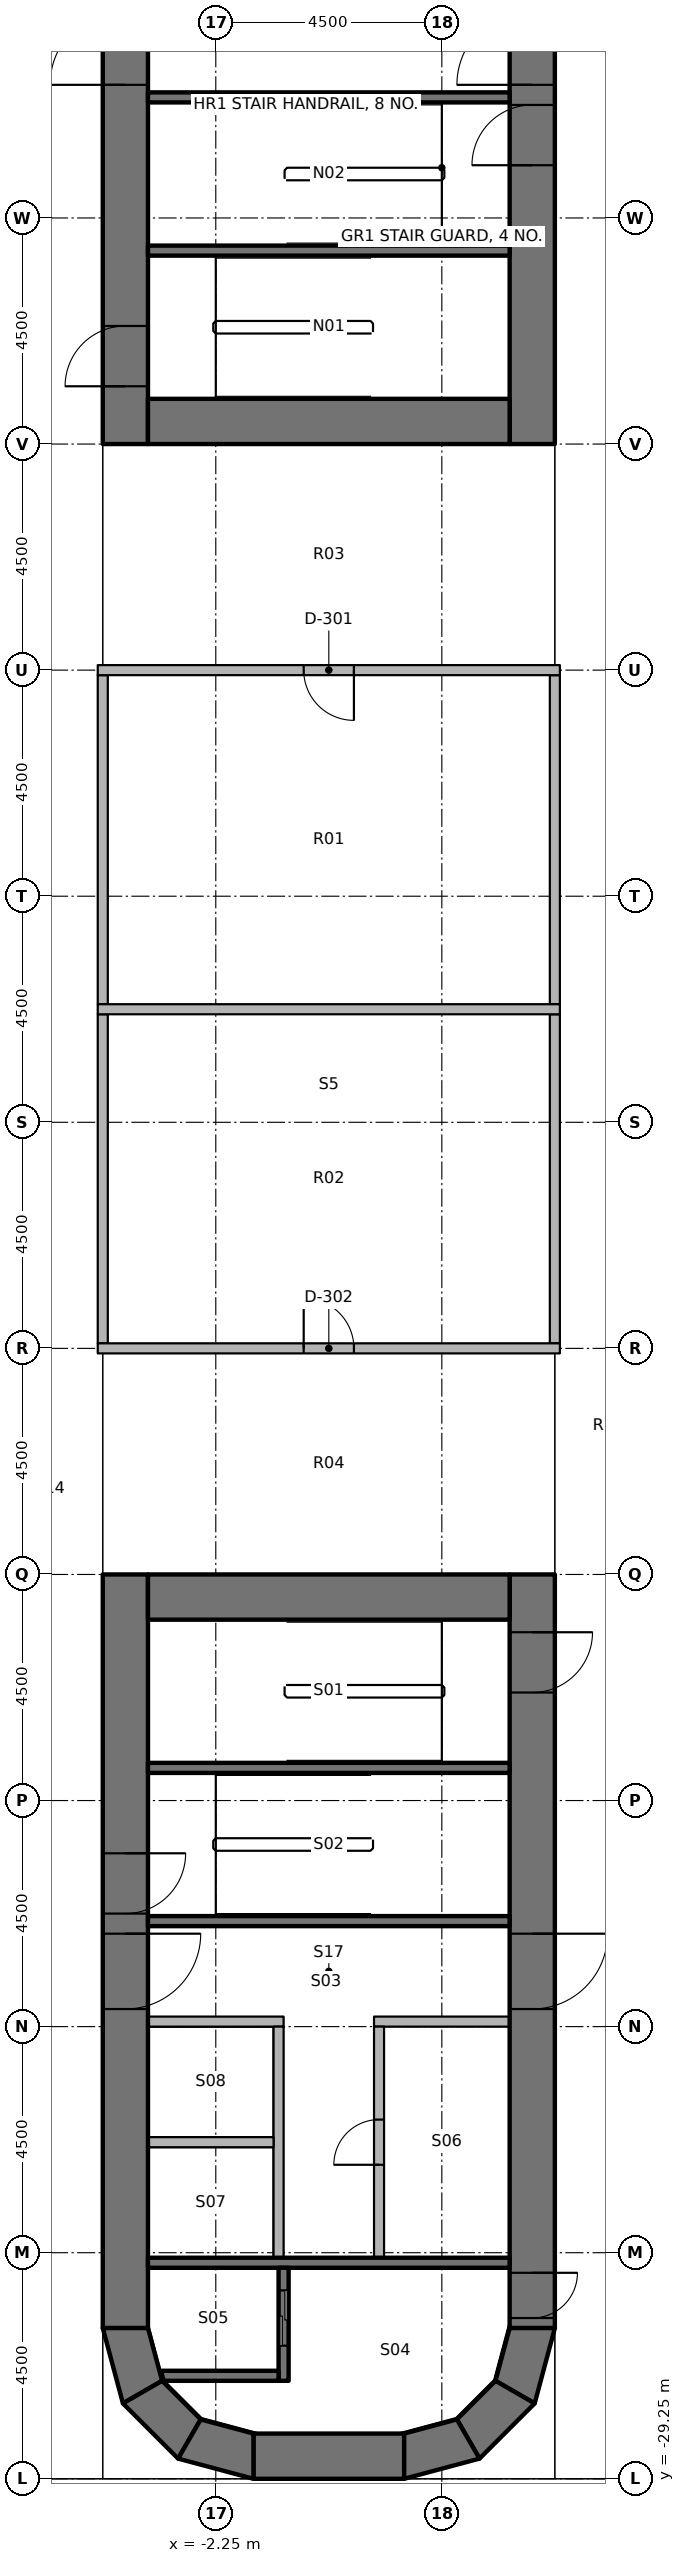
"""IFC4 building model, lengths in metres.
Left out: names, types, materials, properties, quantities, classifications, styles, units other than length and angle.
Written with IfcOpenShell. Run it as: python <this file> out.ifc"""

import sys

from ifc_helpers import new_model, si_unit, direction, frame, frame_2d, origin, place, context, subcontext, project, spatial, polyline, rectangle, outline, extrude, element, fill, save


model = new_model("IFC4")
c1 = context("Model", 3, precision=1e-05, world=origin(), true_north=direction((0.0, 1.0)))
c2 = subcontext(c1, "Body", "Model", "MODEL_VIEW")
j1 = project(units=[si_unit("LENGTHUNIT", "METRE"), si_unit("PLANEANGLEUNIT", "RADIAN")], contexts=[c1])
p1 = place(None, origin())
s1 = spatial("IfcSite", under=j1, at=p1, CompositionType="ELEMENT")
p2 = place(p1, origin())
s2 = spatial("IfcBuilding", under=s1, at=p2, CompositionType="ELEMENT")
p3 = place(p2, frame((0.0, 0.0, 43.8)))
s3 = spatial("IfcBuildingStorey", under=s2, at=p3, CompositionType="ELEMENT", Elevation=43.8)
p4 = place(p3, frame((-4.05, 11.25, 0.0), z_axis=(0.0, 0.0, 1.0), x_axis=(0.0, 1.0, 0.0)))
e1 = element("IfcWall", 1, at=p4, inside=s3, PredefinedType="SHEAR", context=c2, shape_type="SweptSolid", body=[
    extrude(rectangle(XDim=15.0, YDim=0.9, at=frame_2d((7.5, 0.0))), origin(), (0.0, 0.0, 1.0), 4.2),
])
p5 = place(p4, frame((7.15, 0.0, 0.0)))
e2 = element("IfcOpeningElement", 2, at=p5, cuts=e1, PredefinedType="OPENING", context=c2, shape_type="SweptSolid", body=[
    extrude(rectangle(XDim=1.5, YDim=2.3, at=frame_2d((0.75, 1.15))), frame((0.0, 0.46, 0.0), z_axis=(0.0, -1.0, 0.0), x_axis=(1.0, 0.0, 0.0)), (0.0, 0.0, 1.0), 0.92),
])
p6 = place(p4, frame((13.9, 0.0, 0.0)))
e3 = element("IfcOpeningElement", 3, at=p6, cuts=e1, PredefinedType="OPENING", context=c2, shape_type="SweptSolid", body=[
    extrude(rectangle(XDim=0.9, YDim=2.1, at=frame_2d((0.45, 1.05))), frame((0.0, 0.46, 0.0), z_axis=(0.0, -1.0, 0.0), x_axis=(1.0, 0.0, 0.0)), (0.0, 0.0, 1.0), 0.92),
])
p7 = place(p4, frame((1.15, 0.0, 0.0)))
e4 = element("IfcOpeningElement", 4, at=p7, cuts=e1, PredefinedType="OPENING", context=c2, shape_type="SweptSolid", body=[
    extrude(rectangle(XDim=1.2, YDim=2.1, at=frame_2d((0.6, 1.05))), frame((0.0, 0.46, 0.0), z_axis=(0.0, -1.0, 0.0), x_axis=(1.0, 0.0, 0.0)), (0.0, 0.0, 1.0), 0.92),
])
p8 = place(p3, frame((4.05, 11.25, 0.0), z_axis=(0.0, 0.0, 1.0), x_axis=(0.0, 1.0, 0.0)))
e5 = element("IfcWall", 5, at=p8, inside=s3, PredefinedType="SHEAR", context=c2, shape_type="SweptSolid", body=[
    extrude(rectangle(XDim=15.0, YDim=0.9, at=frame_2d((7.5, 0.0))), origin(), (0.0, 0.0, 1.0), 4.2),
])
p9 = place(p8, frame((7.15, 0.0, 0.0)))
e6 = element("IfcOpeningElement", 6, at=p9, cuts=e5, PredefinedType="OPENING", context=c2, shape_type="SweptSolid", body=[
    extrude(rectangle(XDim=1.5, YDim=2.3, at=frame_2d((0.75, 1.15))), frame((0.0, 0.46, 0.0), z_axis=(0.0, -1.0, 0.0), x_axis=(1.0, 0.0, 0.0)), (0.0, 0.0, 1.0), 0.92),
])
p10 = place(p8, frame((5.55, 0.0, 0.0)))
e7 = element("IfcOpeningElement", 7, at=p10, cuts=e5, PredefinedType="OPENING", context=c2, shape_type="SweptSolid", body=[
    extrude(rectangle(XDim=1.2, YDim=2.1, at=frame_2d((0.6, 1.05))), frame((0.0, 0.46, 0.0), z_axis=(0.0, -1.0, 0.0), x_axis=(1.0, 0.0, 0.0)), (0.0, 0.0, 1.0), 0.92),
])
p11 = place(p3, frame((-3.6, 11.7, 0.0), z_axis=(0.0, 0.0, 1.0), x_axis=(1.0, 0.0, 0.0)))
e8 = element("IfcWall", 8, at=p11, inside=s3, PredefinedType="SHEAR", context=c2, shape_type="SweptSolid", body=[
    extrude(rectangle(XDim=7.2, YDim=0.9, at=frame_2d((3.6, 0.0))), origin(), (0.0, 0.0, 1.0), 4.2),
])
p12 = place(p3, frame((-4.05, -11.25, 0.0), z_axis=(0.0, 0.0, 1.0), x_axis=(0.0, -1.0, 0.0)))
e9 = element("IfcWall", 9, at=p12, inside=s3, PredefinedType="SHEAR", context=c2, shape_type="SweptSolid", body=[
    extrude(rectangle(XDim=15.0, YDim=0.9, at=frame_2d((7.5, 0.0))), origin(), (0.0, 0.0, 1.0), 4.2),
])
p13 = place(p12, frame((7.15, 0.0, 0.0)))
e10 = element("IfcOpeningElement", 10, at=p13, cuts=e9, PredefinedType="OPENING", context=c2, shape_type="SweptSolid", body=[
    extrude(rectangle(XDim=1.5, YDim=2.3, at=frame_2d((0.75, 1.15))), frame((0.0, 0.46, 0.0), z_axis=(0.0, -1.0, 0.0), x_axis=(1.0, 0.0, 0.0)), (0.0, 0.0, 1.0), 0.92),
])
p14 = place(p12, frame((5.55, 0.0, 0.0)))
e11 = element("IfcOpeningElement", 11, at=p14, cuts=e9, PredefinedType="OPENING", context=c2, shape_type="SweptSolid", body=[
    extrude(rectangle(XDim=1.2, YDim=2.1, at=frame_2d((0.6, 1.05))), frame((0.0, 0.46, 0.0), z_axis=(0.0, -1.0, 0.0), x_axis=(1.0, 0.0, 0.0)), (0.0, 0.0, 1.0), 0.92),
])
p15 = place(p3, frame((4.05, -11.25, 0.0), z_axis=(0.0, 0.0, 1.0), x_axis=(0.0, -1.0, 0.0)))
e12 = element("IfcWall", 12, at=p15, inside=s3, PredefinedType="SHEAR", context=c2, shape_type="SweptSolid", body=[
    extrude(rectangle(XDim=15.0, YDim=0.9, at=frame_2d((7.5, 0.0))), origin(), (0.0, 0.0, 1.0), 4.2),
])
p16 = place(p15, frame((7.15, 0.0, 0.0)))
e13 = element("IfcOpeningElement", 13, at=p16, cuts=e12, PredefinedType="OPENING", context=c2, shape_type="SweptSolid", body=[
    extrude(rectangle(XDim=1.5, YDim=2.3, at=frame_2d((0.75, 1.15))), frame((0.0, 0.46, 0.0), z_axis=(0.0, -1.0, 0.0), x_axis=(1.0, 0.0, 0.0)), (0.0, 0.0, 1.0), 0.92),
])
p17 = place(p15, frame((13.9, 0.0, 0.0)))
e14 = element("IfcOpeningElement", 14, at=p17, cuts=e12, PredefinedType="OPENING", context=c2, shape_type="SweptSolid", body=[
    extrude(rectangle(XDim=0.9, YDim=2.1, at=frame_2d((0.45, 1.05))), frame((0.0, 0.46, 0.0), z_axis=(0.0, -1.0, 0.0), x_axis=(1.0, 0.0, 0.0)), (0.0, 0.0, 1.0), 0.92),
])
p18 = place(p15, frame((1.15, 0.0, 0.0)))
e15 = element("IfcOpeningElement", 15, at=p18, cuts=e12, PredefinedType="OPENING", context=c2, shape_type="SweptSolid", body=[
    extrude(rectangle(XDim=1.2, YDim=2.1, at=frame_2d((0.6, 1.05))), frame((0.0, 0.46, 0.0), z_axis=(0.0, -1.0, 0.0), x_axis=(1.0, 0.0, 0.0)), (0.0, 0.0, 1.0), 0.92),
])
p19 = place(p3, frame((-3.6, -11.7, 0.0), z_axis=(0.0, 0.0, 1.0), x_axis=(1.0, 0.0, 0.0)))
e16 = element("IfcWall", 16, at=p19, inside=s3, PredefinedType="SHEAR", context=c2, shape_type="SweptSolid", body=[
    extrude(rectangle(XDim=7.2, YDim=0.9, at=frame_2d((3.6, 0.0))), origin(), (0.0, 0.0, 1.0), 4.2),
])
p20 = place(p3, frame((-1.5, -28.8, 0.0), z_axis=(0.0, 0.0, 1.0), x_axis=(1.0, 0.0, 0.0)))
e17 = element("IfcWall", 17, at=p20, inside=s3, PredefinedType="SHEAR", context=c2, shape_type="SweptSolid", body=[
    extrude(rectangle(XDim=3.0, YDim=0.9, at=frame_2d((1.5, 0.0))), origin(), (0.0, 0.0, 1.0), 4.2),
])
p21 = place(p3, origin())
e18 = element("IfcWall", 18, at=p21, inside=s3, PredefinedType="SHEAR", context=c2, shape_type="SweptSolid", body=[
    extrude(outline(polyline([(-4.5, -26.25), (-4.098, -27.75), (-3.319, -27.3), (-3.6, -26.25), (-4.5, -26.25)])), origin(), (0.0, 0.0, 1.0), 4.2),
])
p22 = place(p3, origin())
e19 = element("IfcWall", 19, at=p22, inside=s3, PredefinedType="SHEAR", context=c2, shape_type="SweptSolid", body=[
    extrude(outline(polyline([(-4.098, -27.75), (-3.0, -28.848), (-2.55, -28.069), (-3.319, -27.3), (-4.098, -27.75)])), origin(), (0.0, 0.0, 1.0), 4.2),
])
p23 = place(p3, origin())
e20 = element("IfcWall", 20, at=p23, inside=s3, PredefinedType="SHEAR", context=c2, shape_type="SweptSolid", body=[
    extrude(outline(polyline([(-3.0, -28.848), (-1.5, -29.25), (-1.5, -28.35), (-2.55, -28.069), (-3.0, -28.848)])), origin(), (0.0, 0.0, 1.0), 4.2),
])
p24 = place(p3, origin())
e21 = element("IfcWall", 21, at=p24, inside=s3, PredefinedType="SHEAR", context=c2, shape_type="SweptSolid", body=[
    extrude(outline(polyline([(4.5, -26.25), (4.098, -27.75), (3.319, -27.3), (3.6, -26.25), (4.5, -26.25)])), origin(), (0.0, 0.0, 1.0), 4.2),
])
p25 = place(p3, origin())
e22 = element("IfcWall", 22, at=p25, inside=s3, PredefinedType="SHEAR", context=c2, shape_type="SweptSolid", body=[
    extrude(outline(polyline([(4.098, -27.75), (3.0, -28.848), (2.55, -28.069), (3.319, -27.3), (4.098, -27.75)])), origin(), (0.0, 0.0, 1.0), 4.2),
])
p26 = place(p3, origin())
e23 = element("IfcWall", 23, at=p26, inside=s3, PredefinedType="SHEAR", context=c2, shape_type="SweptSolid", body=[
    extrude(outline(polyline([(3.0, -28.848), (1.5, -29.25), (1.5, -28.35), (2.55, -28.069), (3.0, -28.848)])), origin(), (0.0, 0.0, 1.0), 4.2),
])
for number, where, z_axis, x_axis in (
    (24, (-3.6, 18.15, 0.0), (0.0, 0.0, 1.0), (1.0, 0.0, 0.0)),
    (25, (-3.6, 15.1, 0.0), (0.0, 0.0, 1.0), (1.0, 0.0, 0.0)),
    (26, (3.6, -24.95, 0.0), (0.0, 0.0, 1.0), (-1.0, 0.0, 0.0)),
):
    element("IfcWall", number, at=place(p3, frame(where, z_axis=z_axis, x_axis=x_axis)), inside=s3, PredefinedType="SHEAR", context=c2, shape_type="SweptSolid", body=[
        extrude(rectangle(XDim=7.2, YDim=0.2, at=frame_2d((3.6, 0.0))), origin(), (0.0, 0.0, 1.0), 4.05),
    ])
p27 = place(p3, frame((-0.9, -27.3, 0.0), z_axis=(0.0, 0.0, 1.0), x_axis=(0.0, 1.0, 0.0)))
e27 = element("IfcWall", 27, at=p27, inside=s3, PredefinedType="SHEAR", context=c2, shape_type="SweptSolid", body=[
    extrude(rectangle(XDim=2.25, YDim=0.2, at=frame_2d((1.125, 0.0))), origin(), (0.0, 0.0, 1.0), 4.05),
])
p28 = place(p27, frame((0.7, 0.0, 0.0)))
e28 = element("IfcOpeningElement", 28, at=p28, cuts=e27, PredefinedType="OPENING", context=c2, shape_type="SweptSolid", body=[
    extrude(rectangle(XDim=1.1, YDim=2.3, at=frame_2d((0.55, 1.15))), frame((0.0, 0.11, 0.0), z_axis=(0.0, -1.0, 0.0), x_axis=(1.0, 0.0, 0.0)), (0.0, 0.0, 1.0), 0.22),
])
p29 = place(p3, origin())
e29 = element("IfcWall", 29, at=p29, inside=s3, PredefinedType="SHEAR", context=c2, shape_type="SweptSolid", body=[
    extrude(outline(polyline([(-1.0, -27.1), (-3.341, -27.1), (-3.291, -27.284), (-3.275, -27.3), (-1.0, -27.3), (-1.0, -27.1)])), origin(), (0.0, 0.0, 1.0), 4.05),
])
for number, where, z_axis, x_axis in (
    (30, (3.6, -18.15, 0.0), (0.0, 0.0, 1.0), (-1.0, 0.0, 0.0)),
    (31, (3.6, -15.1, 0.0), (0.0, 0.0, 1.0), (-1.0, 0.0, 0.0)),
):
    element("IfcWall", number, at=place(p3, frame(where, z_axis=z_axis, x_axis=x_axis)), inside=s3, PredefinedType="SHEAR", context=c2, shape_type="SweptSolid", body=[
        extrude(rectangle(XDim=7.2, YDim=0.2, at=frame_2d((3.6, 0.0))), origin(), (0.0, 0.0, 1.0), 4.05),
    ])
p30 = place(p3, frame((3.6, -20.15, 0.0), z_axis=(0.0, 0.0, 1.0), x_axis=(-1.0, 0.0, 0.0)))
e32 = element("IfcWall", 32, at=p30, inside=s3, PredefinedType="PARTITIONING", context=c2, shape_type="SweptSolid", body=[
    extrude(rectangle(XDim=2.7, YDim=0.2, at=frame_2d((1.35, 0.0))), origin(), (0.0, 0.0, 1.0), 4.05),
])
p31 = place(p3, frame((1.0, -24.85, 0.0), z_axis=(0.0, 0.0, 1.0), x_axis=(0.0, 1.0, 0.0)))
e33 = element("IfcWall", 33, at=p31, inside=s3, PredefinedType="PARTITIONING", context=c2, shape_type="SweptSolid", body=[
    extrude(rectangle(XDim=4.6, YDim=0.2, at=frame_2d((2.3, 0.0))), origin(), (0.0, 0.0, 1.0), 4.05),
])
p32 = place(p31, frame((1.85, 0.0, 0.0)))
e34 = element("IfcOpeningElement", 34, at=p32, cuts=e33, PredefinedType="OPENING", context=c2, shape_type="SweptSolid", body=[
    extrude(rectangle(XDim=0.9, YDim=2.1, at=frame_2d((0.45, 1.05))), frame((0.0, 0.11, 0.0), z_axis=(0.0, -1.0, 0.0), x_axis=(1.0, 0.0, 0.0)), (0.0, 0.0, 1.0), 0.22),
])
p33 = place(p3, frame((-0.9, -20.15, 0.0), z_axis=(0.0, 0.0, 1.0), x_axis=(-1.0, 0.0, 0.0)))
e35 = element("IfcWall", 35, at=p33, inside=s3, PredefinedType="PARTITIONING", context=c2, shape_type="SweptSolid", body=[
    extrude(rectangle(XDim=2.7, YDim=0.2, at=frame_2d((1.35, 0.0))), origin(), (0.0, 0.0, 1.0), 4.05),
])
p34 = place(p3, frame((-1.0, -24.85, 0.0), z_axis=(0.0, 0.0, 1.0), x_axis=(0.0, 1.0, 0.0)))
e36 = element("IfcWall", 36, at=p34, inside=s3, PredefinedType="PARTITIONING", context=c2, shape_type="SweptSolid", body=[
    extrude(rectangle(XDim=4.6, YDim=0.2, at=frame_2d((2.3, 0.0))), origin(), (0.0, 0.0, 1.0), 4.05),
])
p35 = place(p3, frame((-1.1, -22.55, 0.0), z_axis=(0.0, 0.0, 1.0), x_axis=(-1.0, 0.0, 0.0)))
e37 = element("IfcWall", 37, at=p35, inside=s3, PredefinedType="PARTITIONING", context=c2, shape_type="SweptSolid", body=[
    extrude(rectangle(XDim=2.5, YDim=0.2, at=frame_2d((1.25, 0.0))), origin(), (0.0, 0.0, 1.0), 4.05),
])
for number, where, z_axis, x_axis in (
    (38, (-4.5, 0.1, 0.0), (0.0, 0.0, 1.0), (0.0, 1.0, 0.0)),
    (39, (-4.5, -6.65, 0.0), (0.0, 0.0, 1.0), (0.0, 1.0, 0.0)),
    (40, (4.5, 0.1, 0.0), (0.0, 0.0, 1.0), (0.0, 1.0, 0.0)),
    (41, (4.5, -6.65, 0.0), (0.0, 0.0, 1.0), (0.0, 1.0, 0.0)),
):
    element("IfcWall", number, at=place(p3, frame(where, z_axis=z_axis, x_axis=x_axis)), inside=s3, PredefinedType="PARTITIONING", context=c2, shape_type="SweptSolid", body=[
        extrude(rectangle(XDim=6.55, YDim=0.2, at=frame_2d((3.275, 0.0))), origin(), (0.0, 0.0, 1.0), 3.13),
    ])
p36 = place(p3, frame((4.6, 6.75, 0.0), z_axis=(0.0, 0.0, 1.0), x_axis=(-1.0, 0.0, 0.0)))
e42 = element("IfcWall", 42, at=p36, inside=s3, PredefinedType="PARTITIONING", context=c2, shape_type="SweptSolid", body=[
    extrude(rectangle(XDim=9.2, YDim=0.2, at=frame_2d((4.6, 0.0))), origin(), (0.0, 0.0, 1.0), 3.13),
])
p37 = place(p36, frame((4.1, 0.0, 0.0)))
e43 = element("IfcOpeningElement", 43, at=p37, cuts=e42, PredefinedType="OPENING", context=c2, shape_type="SweptSolid", body=[
    extrude(rectangle(XDim=1.0, YDim=2.1, at=frame_2d((0.5, 1.05))), frame((0.0, 0.11, 0.0), z_axis=(0.0, -1.0, 0.0), x_axis=(1.0, 0.0, 0.0)), (0.0, 0.0, 1.0), 0.22),
])
p38 = place(p3, frame((-4.6, -6.75, 0.0), z_axis=(0.0, 0.0, 1.0), x_axis=(1.0, 0.0, 0.0)))
e44 = element("IfcWall", 44, at=p38, inside=s3, PredefinedType="PARTITIONING", context=c2, shape_type="SweptSolid", body=[
    extrude(rectangle(XDim=9.2, YDim=0.2, at=frame_2d((4.6, 0.0))), origin(), (0.0, 0.0, 1.0), 3.13),
])
p39 = place(p38, frame((4.1, 0.0, 0.0)))
e45 = element("IfcOpeningElement", 45, at=p39, cuts=e44, PredefinedType="OPENING", context=c2, shape_type="SweptSolid", body=[
    extrude(rectangle(XDim=1.0, YDim=2.1, at=frame_2d((0.5, 1.05))), frame((0.0, 0.11, 0.0), z_axis=(0.0, -1.0, 0.0), x_axis=(1.0, 0.0, 0.0)), (0.0, 0.0, 1.0), 0.22),
])
p40 = place(p3, frame((-4.6, 0.0, 0.0), z_axis=(0.0, 0.0, 1.0), x_axis=(1.0, 0.0, 0.0)))
e46 = element("IfcWall", 46, at=p40, inside=s3, PredefinedType="PARTITIONING", context=c2, shape_type="SweptSolid", body=[
    extrude(rectangle(XDim=9.2, YDim=0.2, at=frame_2d((4.6, 0.0))), origin(), (0.0, 0.0, 1.0), 3.13),
])
p41 = place(p5, origin())
e47 = element("IfcDoor", 47, at=p41, inside=s3, OperationType="DOUBLE_DOOR_SINGLE_SWING", PredefinedType="DOOR", context=c2, shape_type="SweptSolid", body=[
    extrude(rectangle(XDim=1.5, YDim=2.3, at=frame_2d((0.75, 1.15))), frame((0.0, 0.025, 0.0), z_axis=(0.0, -1.0, 0.0), x_axis=(1.0, 0.0, 0.0)), (0.0, 0.0, 1.0), 0.05),
])
fill(e2, e47)
p42 = place(p9, origin())
e48 = element("IfcDoor", 48, at=p42, inside=s3, OperationType="DOUBLE_DOOR_SINGLE_SWING", PredefinedType="DOOR", context=c2, shape_type="SweptSolid", body=[
    extrude(rectangle(XDim=1.5, YDim=2.3, at=frame_2d((0.75, 1.15))), frame((0.0, 0.025, 0.0), z_axis=(0.0, -1.0, 0.0), x_axis=(1.0, 0.0, 0.0)), (0.0, 0.0, 1.0), 0.05),
])
fill(e6, e48)
p43 = place(p10, origin())
e49 = element("IfcDoor", 49, at=p43, inside=s3, OperationType="SINGLE_SWING_RIGHT", PredefinedType="DOOR", context=c2, shape_type="SweptSolid", body=[
    extrude(rectangle(XDim=1.2, YDim=2.1, at=frame_2d((0.6, 1.05))), frame((0.0, 0.025, 0.0), z_axis=(0.0, -1.0, 0.0), x_axis=(1.0, 0.0, 0.0)), (0.0, 0.0, 1.0), 0.05),
])
fill(e7, e49)
p44 = place(p7, origin())
e50 = element("IfcDoor", 50, at=p44, inside=s3, OperationType="SINGLE_SWING_LEFT", PredefinedType="DOOR", context=c2, shape_type="SweptSolid", body=[
    extrude(rectangle(XDim=1.2, YDim=2.1, at=frame_2d((0.6, 1.05))), frame((0.0, 0.025, 0.0), z_axis=(0.0, -1.0, 0.0), x_axis=(1.0, 0.0, 0.0)), (0.0, 0.0, 1.0), 0.05),
])
fill(e4, e50)
p45 = place(p16, origin())
e51 = element("IfcDoor", 51, at=p45, inside=s3, OperationType="DOUBLE_DOOR_SINGLE_SWING", PredefinedType="DOOR", context=c2, shape_type="SweptSolid", body=[
    extrude(rectangle(XDim=1.5, YDim=2.3, at=frame_2d((0.75, 1.15))), frame((0.0, 0.025, 0.0), z_axis=(0.0, -1.0, 0.0), x_axis=(1.0, 0.0, 0.0)), (0.0, 0.0, 1.0), 0.05),
])
fill(e13, e51)
p46 = place(p13, origin())
e52 = element("IfcDoor", 52, at=p46, inside=s3, OperationType="DOUBLE_DOOR_SINGLE_SWING", PredefinedType="DOOR", context=c2, shape_type="SweptSolid", body=[
    extrude(rectangle(XDim=1.5, YDim=2.3, at=frame_2d((0.75, 1.15))), frame((0.0, 0.025, 0.0), z_axis=(0.0, -1.0, 0.0), x_axis=(1.0, 0.0, 0.0)), (0.0, 0.0, 1.0), 0.05),
])
fill(e10, e52)
p47 = place(p17, origin())
e53 = element("IfcDoor", 53, at=p47, inside=s3, OperationType="SINGLE_SWING_RIGHT", PredefinedType="DOOR", context=c2, shape_type="SweptSolid", body=[
    extrude(rectangle(XDim=0.9, YDim=2.1, at=frame_2d((0.45, 1.05))), frame((0.0, 0.025, 0.0), z_axis=(0.0, -1.0, 0.0), x_axis=(1.0, 0.0, 0.0)), (0.0, 0.0, 1.0), 0.05),
])
fill(e14, e53)
p48 = place(p14, origin())
e54 = element("IfcDoor", 54, at=p48, inside=s3, OperationType="SINGLE_SWING_RIGHT", PredefinedType="DOOR", context=c2, shape_type="SweptSolid", body=[
    extrude(rectangle(XDim=1.2, YDim=2.1, at=frame_2d((0.6, 1.05))), frame((0.0, 0.025, 0.0), z_axis=(0.0, -1.0, 0.0), x_axis=(1.0, 0.0, 0.0)), (0.0, 0.0, 1.0), 0.05),
])
fill(e11, e54)
p49 = place(p18, origin())
e55 = element("IfcDoor", 55, at=p49, inside=s3, OperationType="SINGLE_SWING_LEFT", PredefinedType="DOOR", context=c2, shape_type="SweptSolid", body=[
    extrude(rectangle(XDim=1.2, YDim=2.1, at=frame_2d((0.6, 1.05))), frame((0.0, 0.025, 0.0), z_axis=(0.0, -1.0, 0.0), x_axis=(1.0, 0.0, 0.0)), (0.0, 0.0, 1.0), 0.05),
])
fill(e15, e55)
p50 = place(p28, origin())
e56 = element("IfcDoor", 56, at=p50, inside=s3, OperationType="DOUBLE_DOOR_SLIDING", PredefinedType="DOOR", context=c2, shape_type="SweptSolid", body=[
    extrude(rectangle(XDim=1.1, YDim=2.3, at=frame_2d((0.55, 1.15))), frame((0.0, 0.025, 0.0), z_axis=(0.0, -1.0, 0.0), x_axis=(1.0, 0.0, 0.0)), (0.0, 0.0, 1.0), 0.05),
])
fill(e28, e56)
p51 = place(p32, origin())
e57 = element("IfcDoor", 57, at=p51, inside=s3, OperationType="SINGLE_SWING_RIGHT", PredefinedType="DOOR", context=c2, shape_type="SweptSolid", body=[
    extrude(rectangle(XDim=0.9, YDim=2.1, at=frame_2d((0.45, 1.05))), frame((0.0, 0.025, 0.0), z_axis=(0.0, -1.0, 0.0), x_axis=(1.0, 0.0, 0.0)), (0.0, 0.0, 1.0), 0.05),
])
fill(e34, e57)
p52 = place(p37, origin())
e58 = element("IfcDoor", 58, at=p52, inside=s3, OperationType="SINGLE_SWING_RIGHT", PredefinedType="DOOR", context=c2, shape_type="SweptSolid", body=[
    extrude(rectangle(XDim=1.0, YDim=2.1, at=frame_2d((0.5, 1.05))), frame((0.0, 0.025, 0.0), z_axis=(0.0, -1.0, 0.0), x_axis=(1.0, 0.0, 0.0)), (0.0, 0.0, 1.0), 0.05),
])
fill(e43, e58)
p53 = place(p39, origin())
e59 = element("IfcDoor", 59, at=p53, inside=s3, OperationType="SINGLE_SWING_RIGHT", PredefinedType="DOOR", context=c2, shape_type="SweptSolid", body=[
    extrude(rectangle(XDim=1.0, YDim=2.1, at=frame_2d((0.5, 1.05))), frame((0.0, 0.025, 0.0), z_axis=(0.0, -1.0, 0.0), x_axis=(1.0, 0.0, 0.0)), (0.0, 0.0, 1.0), 0.05),
])
fill(e45, e59)
save(model, sys.argv[1])
